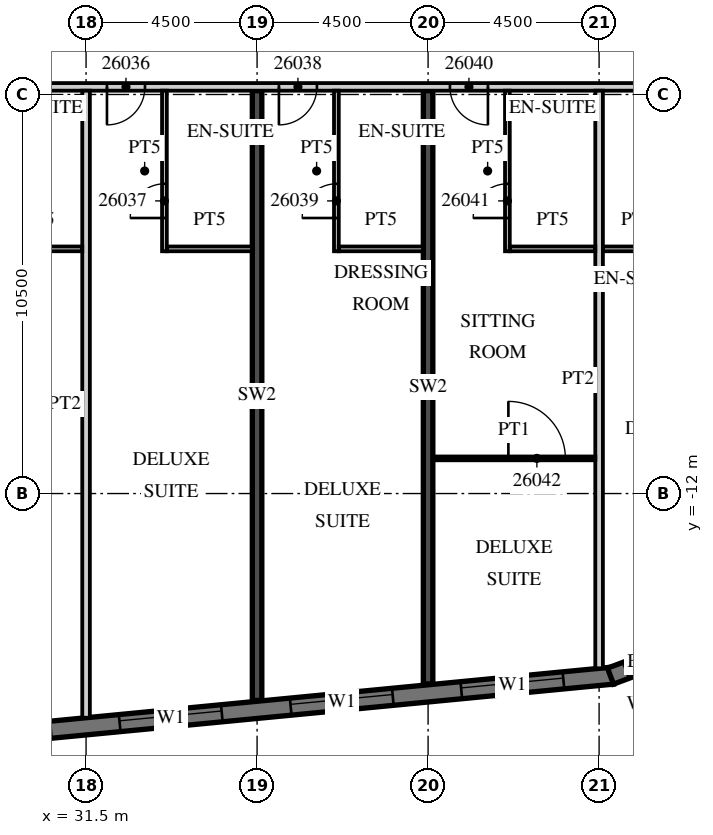
"""IFC4 building model, lengths in metres.
Left out: names, types, materials, properties, quantities, classifications, styles, units other than length and angle.
Written with IfcOpenShell. Run it as: python <this file> out.ifc"""

import sys

from ifc_helpers import new_model, si_unit, direction, frame, frame_2d, origin, place, context, subcontext, project, spatial, polyline, rectangle, outline, extrude, element, fill, save


model = new_model("IFC4")
c1 = context("Model", 3, precision=1e-05, world=origin(), true_north=direction((0.0, 1.0)))
c2 = subcontext(c1, "Body", "Model", "MODEL_VIEW")
j1 = project(units=[si_unit("LENGTHUNIT", "METRE"), si_unit("PLANEANGLEUNIT", "RADIAN")], contexts=[c1])
p1 = place(None, origin())
s1 = spatial("IfcSite", under=j1, at=p1, CompositionType="ELEMENT")
p2 = place(p1, origin())
s2 = spatial("IfcBuilding", under=s1, at=p2, CompositionType="ELEMENT")
p3 = place(p2, frame((0.0, 0.0, 120.7)))
s3 = spatial("IfcBuildingStorey", under=s2, at=p3, CompositionType="ELEMENT", Elevation=120.7)
p4 = place(p3, frame((36.0, -17.444, 0.0), z_axis=(0.0, 0.0, 1.0), x_axis=(0.0, 1.0, 0.0)))
e1 = element("IfcWall", 1, at=p4, inside=s3, PredefinedType="SHEAR", context=c2, shape_type="SweptSolid", body=[
    extrude(rectangle(XDim=16.044, YDim=0.25, at=frame_2d((8.022, 0.0))), origin(), (0.0, 0.0, 1.0), 3.3),
])
p5 = place(p3, frame((40.5, -17.011, 0.0), z_axis=(0.0, 0.0, 1.0), x_axis=(0.0, 1.0, 0.0)))
e2 = element("IfcWall", 2, at=p5, inside=s3, PredefinedType="SHEAR", context=c2, shape_type="SweptSolid", body=[
    extrude(rectangle(XDim=15.611, YDim=0.25, at=frame_2d((7.805, 0.0))), origin(), (0.0, 0.0, 1.0), 3.3),
])
p6 = place(p3, frame((-13.521, -22.46, 0.0), z_axis=(0.0, 0.0, 1.0), x_axis=(0.995396096335, 0.095846812164, 0.0)))
e3 = element("IfcWall", 3, at=p6, inside=s3, PredefinedType="SOLIDWALL", context=c2, shape_type="SweptSolid", body=[
    extrude(rectangle(XDim=59.151, YDim=0.45, at=frame_2d((29.575, 0.0))), origin(), (0.0, 0.0, 1.0), 3.02),
])
p7 = place(p6, frame((0.91, 0.0, 0.45)))
e4 = element("IfcOpeningElement", 4, at=p7, cuts=e3, PredefinedType="OPENING", context=c2, shape_type="SweptSolid", body=[
    extrude(rectangle(XDim=2.7, YDim=2.25, at=frame_2d((1.35, 1.125))), frame((0.0, 0.235, 0.0), z_axis=(0.0, -1.0, 0.0), x_axis=(1.0, 0.0, 0.0)), (0.0, 0.0, 1.0), 0.47),
])
p8 = place(p6, frame((5.431, 0.0, 0.45)))
e5 = element("IfcOpeningElement", 5, at=p8, cuts=e3, PredefinedType="OPENING", context=c2, shape_type="SweptSolid", body=[
    extrude(rectangle(XDim=2.7, YDim=2.25, at=frame_2d((1.35, 1.125))), frame((0.0, 0.235, 0.0), z_axis=(0.0, -1.0, 0.0), x_axis=(1.0, 0.0, 0.0)), (0.0, 0.0, 1.0), 0.47),
])
p9 = place(p6, frame((9.952, 0.0, 0.45)))
e6 = element("IfcOpeningElement", 6, at=p9, cuts=e3, PredefinedType="OPENING", context=c2, shape_type="SweptSolid", body=[
    extrude(rectangle(XDim=2.7, YDim=2.25, at=frame_2d((1.35, 1.125))), frame((0.0, 0.235, 0.0), z_axis=(0.0, -1.0, 0.0), x_axis=(1.0, 0.0, 0.0)), (0.0, 0.0, 1.0), 0.47),
])
p10 = place(p6, frame((14.473, 0.0, 0.45)))
e7 = element("IfcOpeningElement", 7, at=p10, cuts=e3, PredefinedType="OPENING", context=c2, shape_type="SweptSolid", body=[
    extrude(rectangle(XDim=2.7, YDim=2.25, at=frame_2d((1.35, 1.125))), frame((0.0, 0.235, 0.0), z_axis=(0.0, -1.0, 0.0), x_axis=(1.0, 0.0, 0.0)), (0.0, 0.0, 1.0), 0.47),
])
p11 = place(p6, frame((18.994, 0.0, 0.45)))
e8 = element("IfcOpeningElement", 8, at=p11, cuts=e3, PredefinedType="OPENING", context=c2, shape_type="SweptSolid", body=[
    extrude(rectangle(XDim=2.7, YDim=2.25, at=frame_2d((1.35, 1.125))), frame((0.0, 0.235, 0.0), z_axis=(0.0, -1.0, 0.0), x_axis=(1.0, 0.0, 0.0)), (0.0, 0.0, 1.0), 0.47),
])
p12 = place(p6, frame((23.514, 0.0, 0.45)))
e9 = element("IfcOpeningElement", 9, at=p12, cuts=e3, PredefinedType="OPENING", context=c2, shape_type="SweptSolid", body=[
    extrude(rectangle(XDim=2.7, YDim=2.25, at=frame_2d((1.35, 1.125))), frame((0.0, 0.235, 0.0), z_axis=(0.0, -1.0, 0.0), x_axis=(1.0, 0.0, 0.0)), (0.0, 0.0, 1.0), 0.47),
])
p13 = place(p6, frame((28.035, 0.0, 0.45)))
e10 = element("IfcOpeningElement", 10, at=p13, cuts=e3, PredefinedType="OPENING", context=c2, shape_type="SweptSolid", body=[
    extrude(rectangle(XDim=2.7, YDim=2.25, at=frame_2d((1.35, 1.125))), frame((0.0, 0.235, 0.0), z_axis=(0.0, -1.0, 0.0), x_axis=(1.0, 0.0, 0.0)), (0.0, 0.0, 1.0), 0.47),
])
p14 = place(p6, frame((32.556, 0.0, 0.45)))
e11 = element("IfcOpeningElement", 11, at=p14, cuts=e3, PredefinedType="OPENING", context=c2, shape_type="SweptSolid", body=[
    extrude(rectangle(XDim=2.7, YDim=2.25, at=frame_2d((1.35, 1.125))), frame((0.0, 0.235, 0.0), z_axis=(0.0, -1.0, 0.0), x_axis=(1.0, 0.0, 0.0)), (0.0, 0.0, 1.0), 0.47),
])
p15 = place(p6, frame((37.077, 0.0, 0.45)))
e12 = element("IfcOpeningElement", 12, at=p15, cuts=e3, PredefinedType="OPENING", context=c2, shape_type="SweptSolid", body=[
    extrude(rectangle(XDim=2.7, YDim=2.25, at=frame_2d((1.35, 1.125))), frame((0.0, 0.235, 0.0), z_axis=(0.0, -1.0, 0.0), x_axis=(1.0, 0.0, 0.0)), (0.0, 0.0, 1.0), 0.47),
])
p16 = place(p6, frame((41.598, 0.0, 0.45)))
e13 = element("IfcOpeningElement", 13, at=p16, cuts=e3, PredefinedType="OPENING", context=c2, shape_type="SweptSolid", body=[
    extrude(rectangle(XDim=2.7, YDim=2.25, at=frame_2d((1.35, 1.125))), frame((0.0, 0.235, 0.0), z_axis=(0.0, -1.0, 0.0), x_axis=(1.0, 0.0, 0.0)), (0.0, 0.0, 1.0), 0.47),
])
p17 = place(p6, frame((46.118, 0.0, 0.45)))
e14 = element("IfcOpeningElement", 14, at=p17, cuts=e3, PredefinedType="OPENING", context=c2, shape_type="SweptSolid", body=[
    extrude(rectangle(XDim=2.7, YDim=2.25, at=frame_2d((1.35, 1.125))), frame((0.0, 0.235, 0.0), z_axis=(0.0, -1.0, 0.0), x_axis=(1.0, 0.0, 0.0)), (0.0, 0.0, 1.0), 0.47),
])
p18 = place(p6, frame((50.639, 0.0, 0.45)))
e15 = element("IfcOpeningElement", 15, at=p18, cuts=e3, PredefinedType="OPENING", context=c2, shape_type="SweptSolid", body=[
    extrude(rectangle(XDim=2.7, YDim=2.25, at=frame_2d((1.35, 1.125))), frame((0.0, 0.235, 0.0), z_axis=(0.0, -1.0, 0.0), x_axis=(1.0, 0.0, 0.0)), (0.0, 0.0, 1.0), 0.47),
])
p19 = place(p6, frame((55.15, 0.0, 0.45)))
e16 = element("IfcOpeningElement", 16, at=p19, cuts=e3, PredefinedType="OPENING", context=c2, shape_type="SweptSolid", body=[
    extrude(rectangle(XDim=2.7, YDim=2.25, at=frame_2d((1.35, 1.125))), frame((0.0, 0.235, 0.0), z_axis=(0.0, -1.0, 0.0), x_axis=(1.0, 0.0, 0.0)), (0.0, 0.0, 1.0), 0.47),
])
p20 = place(p3, frame((45.3, -16.804, 0.0), z_axis=(0.0, 0.0, 1.0), x_axis=(0.936677599948, 0.350192909346, 0.0)))
e17 = element("IfcWall", 17, at=p20, inside=s3, PredefinedType="SOLIDWALL", context=c2, shape_type="SweptSolid", body=[
    extrude(outline(polyline([(0.0, -0.225), (2.071, -0.225), (1.95, 0.225), (0.121, 0.225), (0.0, -0.225)])), origin(), (0.0, 0.0, 1.0), 3.02),
])
p21 = place(p20, frame((0.435, 0.0, 0.45)))
e18 = element("IfcOpeningElement", 18, at=p21, cuts=e17, PredefinedType="OPENING", context=c2, shape_type="SweptSolid", body=[
    extrude(rectangle(XDim=1.2, YDim=2.25, at=frame_2d((0.6, 1.125))), frame((0.0, 0.235, 0.0), z_axis=(0.0, -1.0, 0.0), x_axis=(1.0, 0.0, 0.0)), (0.0, 0.0, 1.0), 0.47),
])
p22 = place(p3, frame((48.753, -12.672, 0.0), z_axis=(0.0, 0.0, 1.0), x_axis=(-0.095842661909, 0.995396495954, 0.0)))
e19 = element("IfcWall", 19, at=p22, inside=s3, PredefinedType="SOLIDWALL", context=c2, shape_type="SweptSolid", body=[
    extrude(rectangle(XDim=35.0, YDim=0.45, at=frame_2d((17.5, 0.0))), origin(), (0.0, 0.0, 1.0), 3.02),
])
p23 = place(p22, frame((3.072, 0.0, 0.45)))
e20 = element("IfcOpeningElement", 20, at=p23, cuts=e19, PredefinedType="OPENING", context=c2, shape_type="SweptSolid", body=[
    extrude(rectangle(XDim=3.3, YDim=2.25, at=frame_2d((1.65, 1.125))), frame((0.0, 0.235, 0.0), z_axis=(0.0, -1.0, 0.0), x_axis=(1.0, 0.0, 0.0)), (0.0, 0.0, 1.0), 0.47),
])
p24 = place(p22, frame((7.593, 0.0, 0.45)))
e21 = element("IfcOpeningElement", 21, at=p24, cuts=e19, PredefinedType="OPENING", context=c2, shape_type="SweptSolid", body=[
    extrude(rectangle(XDim=3.3, YDim=2.25, at=frame_2d((1.65, 1.125))), frame((0.0, 0.235, 0.0), z_axis=(0.0, -1.0, 0.0), x_axis=(1.0, 0.0, 0.0)), (0.0, 0.0, 1.0), 0.47),
])
p25 = place(p3, frame((-13.5, -1.3, 0.0), z_axis=(0.0, 0.0, 1.0), x_axis=(1.0, 0.0, 0.0)))
e22 = element("IfcWall", 22, at=p25, inside=s3, PredefinedType="PARTITIONING", context=c2, shape_type="SweptSolid", body=[
    extrude(rectangle(XDim=60.932, YDim=0.2, at=frame_2d((30.466, 0.0))), origin(), (0.0, 0.0, 1.0), 3.02),
])
p26 = place(p25, frame((2.925, 0.0, 0.0)))
e23 = element("IfcOpeningElement", 23, at=p26, cuts=e22, PredefinedType="OPENING", context=c2, shape_type="SweptSolid", body=[
    extrude(rectangle(XDim=1.0, YDim=2.1, at=frame_2d((0.5, 1.05))), frame((0.0, 0.11, 0.0), z_axis=(0.0, -1.0, 0.0), x_axis=(1.0, 0.0, 0.0)), (0.0, 0.0, 1.0), 0.22),
])
p27 = place(p25, frame((9.863, 0.0, 0.0)))
e24 = element("IfcOpeningElement", 24, at=p27, cuts=e22, PredefinedType="OPENING", context=c2, shape_type="SweptSolid", body=[
    extrude(rectangle(XDim=1.2, YDim=2.1, at=frame_2d((0.6, 1.05))), frame((0.0, 0.11, 0.0), z_axis=(0.0, -1.0, 0.0), x_axis=(1.0, 0.0, 0.0)), (0.0, 0.0, 1.0), 0.22),
])
p28 = place(p25, frame((15.938, 0.0, 0.0)))
e25 = element("IfcOpeningElement", 25, at=p28, cuts=e22, PredefinedType="OPENING", context=c2, shape_type="SweptSolid", body=[
    extrude(rectangle(XDim=1.2, YDim=2.1, at=frame_2d((0.6, 1.05))), frame((0.0, 0.11, 0.0), z_axis=(0.0, -1.0, 0.0), x_axis=(1.0, 0.0, 0.0)), (0.0, 0.0, 1.0), 0.22),
])
p29 = place(p25, frame((27.862, 0.0, 0.0)))
e26 = element("IfcOpeningElement", 26, at=p29, cuts=e22, PredefinedType="OPENING", context=c2, shape_type="SweptSolid", body=[
    extrude(rectangle(XDim=1.2, YDim=2.1, at=frame_2d((0.6, 1.05))), frame((0.0, 0.11, 0.0), z_axis=(0.0, -1.0, 0.0), x_axis=(1.0, 0.0, 0.0)), (0.0, 0.0, 1.0), 0.22),
])
p30 = place(p25, frame((34.45, 0.0, 0.0)))
e27 = element("IfcOpeningElement", 27, at=p30, cuts=e22, PredefinedType="OPENING", context=c2, shape_type="SweptSolid", body=[
    extrude(rectangle(XDim=1.0, YDim=2.1, at=frame_2d((0.5, 1.05))), frame((0.0, 0.11, 0.0), z_axis=(0.0, -1.0, 0.0), x_axis=(1.0, 0.0, 0.0)), (0.0, 0.0, 1.0), 0.22),
])
p31 = place(p25, frame((36.55, 0.0, 0.0)))
e28 = element("IfcOpeningElement", 28, at=p31, cuts=e22, PredefinedType="OPENING", context=c2, shape_type="SweptSolid", body=[
    extrude(rectangle(XDim=1.0, YDim=2.1, at=frame_2d((0.5, 1.05))), frame((0.0, 0.11, 0.0), z_axis=(0.0, -1.0, 0.0), x_axis=(1.0, 0.0, 0.0)), (0.0, 0.0, 1.0), 0.22),
])
p32 = place(p25, frame((41.075, 0.0, 0.0)))
e29 = element("IfcOpeningElement", 29, at=p32, cuts=e22, PredefinedType="OPENING", context=c2, shape_type="SweptSolid", body=[
    extrude(rectangle(XDim=1.0, YDim=2.1, at=frame_2d((0.5, 1.05))), frame((0.0, 0.11, 0.0), z_axis=(0.0, -1.0, 0.0), x_axis=(1.0, 0.0, 0.0)), (0.0, 0.0, 1.0), 0.22),
])
p33 = place(p25, frame((45.55, 0.0, 0.0)))
e30 = element("IfcOpeningElement", 30, at=p33, cuts=e22, PredefinedType="OPENING", context=c2, shape_type="SweptSolid", body=[
    extrude(rectangle(XDim=1.0, YDim=2.1, at=frame_2d((0.5, 1.05))), frame((0.0, 0.11, 0.0), z_axis=(0.0, -1.0, 0.0), x_axis=(1.0, 0.0, 0.0)), (0.0, 0.0, 1.0), 0.22),
])
p34 = place(p25, frame((50.075, 0.0, 0.0)))
e31 = element("IfcOpeningElement", 31, at=p34, cuts=e22, PredefinedType="OPENING", context=c2, shape_type="SweptSolid", body=[
    extrude(rectangle(XDim=1.0, YDim=2.1, at=frame_2d((0.5, 1.05))), frame((0.0, 0.11, 0.0), z_axis=(0.0, -1.0, 0.0), x_axis=(1.0, 0.0, 0.0)), (0.0, 0.0, 1.0), 0.22),
])
p35 = place(p25, frame((54.575, 0.0, 0.0)))
e32 = element("IfcOpeningElement", 32, at=p35, cuts=e22, PredefinedType="OPENING", context=c2, shape_type="SweptSolid", body=[
    extrude(rectangle(XDim=1.0, YDim=2.1, at=frame_2d((0.5, 1.05))), frame((0.0, 0.11, 0.0), z_axis=(0.0, -1.0, 0.0), x_axis=(1.0, 0.0, 0.0)), (0.0, 0.0, 1.0), 0.22),
])
p36 = place(p25, frame((59.882, 0.0, 0.0)))
e33 = element("IfcOpeningElement", 33, at=p36, cuts=e22, PredefinedType="OPENING", context=c2, shape_type="SweptSolid", body=[
    extrude(rectangle(XDim=0.9, YDim=2.1, at=frame_2d((0.45, 1.05))), frame((0.0, 0.11, 0.0), z_axis=(0.0, -1.0, 0.0), x_axis=(1.0, 0.0, 0.0)), (0.0, 0.0, 1.0), 0.22),
])
p37 = place(p3, frame((31.5, -17.899, 0.0), z_axis=(0.0, 0.0, 1.0), x_axis=(0.0, 1.0, 0.0)))
e34 = element("IfcWall", 34, at=p37, inside=s3, PredefinedType="PARTITIONING", context=c2, shape_type="SweptSolid", body=[
    extrude(rectangle(XDim=16.499, YDim=0.2, at=frame_2d((8.25, 0.0))), origin(), (0.0, 0.0, 1.0), 3.02),
])
p38 = place(p3, frame((29.15, -5.562, 0.0), z_axis=(0.0, 0.0, 1.0), x_axis=(1.0, 0.0, 0.0)))
e35 = element("IfcWall", 35, at=p38, inside=s3, PredefinedType="PARTITIONING", context=c2, shape_type="SweptSolid", body=[
    extrude(rectangle(XDim=2.25, YDim=0.125, at=frame_2d((1.125, 0.0))), origin(), (0.0, 0.0, 1.0), 3.02),
])
p39 = place(p3, frame((33.562, -5.625, 0.0), z_axis=(0.0, 0.0, 1.0), x_axis=(0.0, 1.0, 0.0)))
e36 = element("IfcWall", 36, at=p39, inside=s3, PredefinedType="PARTITIONING", context=c2, shape_type="SweptSolid", body=[
    extrude(rectangle(XDim=4.225, YDim=0.125, at=frame_2d((2.113, 0.0))), origin(), (0.0, 0.0, 1.0), 3.02),
])
p40 = place(p39, frame((0.875, 0.0, 0.0)))
e37 = element("IfcOpeningElement", 37, at=p40, cuts=e36, PredefinedType="OPENING", context=c2, shape_type="SweptSolid", body=[
    extrude(rectangle(XDim=0.9, YDim=2.1, at=frame_2d((0.45, 1.05))), frame((0.0, 0.073, 0.0), z_axis=(0.0, -1.0, 0.0), x_axis=(1.0, 0.0, 0.0)), (0.0, 0.0, 1.0), 0.145),
])
p41 = place(p3, frame((33.625, -5.562, 0.0), z_axis=(0.0, 0.0, 1.0), x_axis=(1.0, 0.0, 0.0)))
e38 = element("IfcWall", 38, at=p41, inside=s3, PredefinedType="PARTITIONING", context=c2, shape_type="SweptSolid", body=[
    extrude(rectangle(XDim=2.25, YDim=0.125, at=frame_2d((1.125, 0.0))), origin(), (0.0, 0.0, 1.0), 3.02),
])
p42 = place(p3, frame((38.087, -5.625, 0.0), z_axis=(0.0, 0.0, 1.0), x_axis=(0.0, 1.0, 0.0)))
e39 = element("IfcWall", 39, at=p42, inside=s3, PredefinedType="PARTITIONING", context=c2, shape_type="SweptSolid", body=[
    extrude(rectangle(XDim=4.225, YDim=0.125, at=frame_2d((2.113, 0.0))), origin(), (0.0, 0.0, 1.0), 3.02),
])
p43 = place(p42, frame((0.875, 0.0, 0.0)))
e40 = element("IfcOpeningElement", 40, at=p43, cuts=e39, PredefinedType="OPENING", context=c2, shape_type="SweptSolid", body=[
    extrude(rectangle(XDim=0.9, YDim=2.1, at=frame_2d((0.45, 1.05))), frame((0.0, 0.073, 0.0), z_axis=(0.0, -1.0, 0.0), x_axis=(1.0, 0.0, 0.0)), (0.0, 0.0, 1.0), 0.145),
])
p44 = place(p3, frame((38.15, -5.562, 0.0), z_axis=(0.0, 0.0, 1.0), x_axis=(1.0, 0.0, 0.0)))
e41 = element("IfcWall", 41, at=p44, inside=s3, PredefinedType="PARTITIONING", context=c2, shape_type="SweptSolid", body=[
    extrude(rectangle(XDim=2.225, YDim=0.125, at=frame_2d((1.113, 0.0))), origin(), (0.0, 0.0, 1.0), 3.02),
])
p45 = place(p3, frame((45.0, -16.599, 0.0), z_axis=(0.0, 0.0, 1.0), x_axis=(0.0, 1.0, 0.0)))
e42 = element("IfcWall", 42, at=p45, inside=s3, PredefinedType="PARTITIONING", context=c2, shape_type="SweptSolid", body=[
    extrude(rectangle(XDim=15.199, YDim=0.2, at=frame_2d((7.6, 0.0))), origin(), (0.0, 0.0, 1.0), 3.02),
])
p46 = place(p3, frame((42.587, -5.625, 0.0), z_axis=(0.0, 0.0, 1.0), x_axis=(0.0, 1.0, 0.0)))
e43 = element("IfcWall", 43, at=p46, inside=s3, PredefinedType="PARTITIONING", context=c2, shape_type="SweptSolid", body=[
    extrude(rectangle(XDim=4.225, YDim=0.125, at=frame_2d((2.113, 0.0))), origin(), (0.0, 0.0, 1.0), 3.02),
])
p47 = place(p46, frame((0.875, 0.0, 0.0)))
e44 = element("IfcOpeningElement", 44, at=p47, cuts=e43, PredefinedType="OPENING", context=c2, shape_type="SweptSolid", body=[
    extrude(rectangle(XDim=0.9, YDim=2.1, at=frame_2d((0.45, 1.05))), frame((0.0, 0.073, 0.0), z_axis=(0.0, -1.0, 0.0), x_axis=(1.0, 0.0, 0.0)), (0.0, 0.0, 1.0), 0.145),
])
p48 = place(p3, frame((42.65, -5.562, 0.0), z_axis=(0.0, 0.0, 1.0), x_axis=(1.0, 0.0, 0.0)))
e45 = element("IfcWall", 45, at=p48, inside=s3, PredefinedType="PARTITIONING", context=c2, shape_type="SweptSolid", body=[
    extrude(rectangle(XDim=2.25, YDim=0.125, at=frame_2d((1.125, 0.0))), origin(), (0.0, 0.0, 1.0), 3.02),
])
p49 = place(p3, frame((40.625, -11.075, 0.0), z_axis=(0.0, 0.0, 1.0), x_axis=(1.0, 0.0, 0.0)))
e46 = element("IfcWall", 46, at=p49, inside=s3, PredefinedType="PARTITIONING", context=c2, shape_type="SweptSolid", body=[
    extrude(rectangle(XDim=4.275, YDim=0.1, at=frame_2d((2.137, 0.0))), origin(), (0.0, 0.0, 1.0), 3.02),
])
p50 = place(p49, frame((1.988, 0.0, 0.0)))
e47 = element("IfcOpeningElement", 47, at=p50, cuts=e46, PredefinedType="OPENING", context=c2, shape_type="SweptSolid", body=[
    extrude(rectangle(XDim=1.5, YDim=2.1, at=frame_2d((0.75, 1.05))), frame((0.0, 0.06, 0.0), z_axis=(0.0, -1.0, 0.0), x_axis=(1.0, 0.0, 0.0)), (0.0, 0.0, 1.0), 0.12),
])
p51 = place(p3, frame((45.1, -5.562, 0.0), z_axis=(0.0, 0.0, 1.0), x_axis=(1.0, 0.0, 0.0)))
e48 = element("IfcWall", 48, at=p51, inside=s3, PredefinedType="PARTITIONING", context=c2, shape_type="SweptSolid", body=[
    extrude(rectangle(XDim=1.8, YDim=0.125, at=frame_2d((0.9, 0.0))), origin(), (0.0, 0.0, 1.0), 3.02),
])
p52 = place(p17, origin())
e49 = element("IfcWindow", 49, at=p52, inside=s3, PartitioningType="SINGLE_PANEL", PredefinedType="WINDOW", context=c2, shape_type="SweptSolid", body=[
    extrude(rectangle(XDim=2.7, YDim=2.25, at=frame_2d((1.35, 1.125))), frame((0.0, 0.09, 0.0), z_axis=(0.0, -1.0, 0.0), x_axis=(1.0, 0.0, 0.0)), (0.0, 0.0, 1.0), 0.06),
])
fill(e14, e49)
p53 = place(p18, origin())
e50 = element("IfcWindow", 50, at=p53, inside=s3, PartitioningType="SINGLE_PANEL", PredefinedType="WINDOW", context=c2, shape_type="SweptSolid", body=[
    extrude(rectangle(XDim=2.7, YDim=2.25, at=frame_2d((1.35, 1.125))), frame((0.0, 0.09, 0.0), z_axis=(0.0, -1.0, 0.0), x_axis=(1.0, 0.0, 0.0)), (0.0, 0.0, 1.0), 0.06),
])
fill(e15, e50)
p54 = place(p19, origin())
e51 = element("IfcWindow", 51, at=p54, inside=s3, PartitioningType="SINGLE_PANEL", PredefinedType="WINDOW", context=c2, shape_type="SweptSolid", body=[
    extrude(rectangle(XDim=2.7, YDim=2.25, at=frame_2d((1.35, 1.125))), frame((0.0, 0.09, 0.0), z_axis=(0.0, -1.0, 0.0), x_axis=(1.0, 0.0, 0.0)), (0.0, 0.0, 1.0), 0.06),
])
fill(e16, e51)
p55 = place(p21, origin())
e52 = element("IfcWindow", 52, at=p55, inside=s3, PartitioningType="SINGLE_PANEL", PredefinedType="WINDOW", context=c2, shape_type="SweptSolid", body=[
    extrude(rectangle(XDim=1.2, YDim=2.25, at=frame_2d((0.6, 1.125))), frame((0.0, 0.09, 0.0), z_axis=(0.0, -1.0, 0.0), x_axis=(1.0, 0.0, 0.0)), (0.0, 0.0, 1.0), 0.06),
])
fill(e18, e52)
p56 = place(p33, origin())
e53 = element("IfcDoor", 53, at=p56, inside=s3, OperationType="SINGLE_SWING_LEFT", PredefinedType="DOOR", context=c2, shape_type="SweptSolid", body=[
    extrude(rectangle(XDim=1.0, YDim=2.1, at=frame_2d((0.5, 1.05))), frame((0.0, 0.025, 0.0), z_axis=(0.0, -1.0, 0.0), x_axis=(1.0, 0.0, 0.0)), (0.0, 0.0, 1.0), 0.05),
])
fill(e30, e53)
p57 = place(p40, origin())
e54 = element("IfcDoor", 54, at=p57, inside=s3, OperationType="SINGLE_SWING_LEFT", PredefinedType="DOOR", context=c2, shape_type="SweptSolid", body=[
    extrude(rectangle(XDim=0.9, YDim=2.1, at=frame_2d((0.45, 1.05))), frame((0.0, 0.025, 0.0), z_axis=(0.0, -1.0, 0.0), x_axis=(1.0, 0.0, 0.0)), (0.0, 0.0, 1.0), 0.05),
])
fill(e37, e54)
p58 = place(p34, origin())
e55 = element("IfcDoor", 55, at=p58, inside=s3, OperationType="SINGLE_SWING_LEFT", PredefinedType="DOOR", context=c2, shape_type="SweptSolid", body=[
    extrude(rectangle(XDim=1.0, YDim=2.1, at=frame_2d((0.5, 1.05))), frame((0.0, 0.025, 0.0), z_axis=(0.0, -1.0, 0.0), x_axis=(1.0, 0.0, 0.0)), (0.0, 0.0, 1.0), 0.05),
])
fill(e31, e55)
p59 = place(p43, origin())
e56 = element("IfcDoor", 56, at=p59, inside=s3, OperationType="SINGLE_SWING_LEFT", PredefinedType="DOOR", context=c2, shape_type="SweptSolid", body=[
    extrude(rectangle(XDim=0.9, YDim=2.1, at=frame_2d((0.45, 1.05))), frame((0.0, 0.025, 0.0), z_axis=(0.0, -1.0, 0.0), x_axis=(1.0, 0.0, 0.0)), (0.0, 0.0, 1.0), 0.05),
])
fill(e40, e56)
p60 = place(p35, origin())
e57 = element("IfcDoor", 57, at=p60, inside=s3, OperationType="SINGLE_SWING_RIGHT", PredefinedType="DOOR", context=c2, shape_type="SweptSolid", body=[
    extrude(rectangle(XDim=1.0, YDim=2.1, at=frame_2d((0.5, 1.05))), frame((0.0, 0.025, 0.0), z_axis=(0.0, -1.0, 0.0), x_axis=(1.0, 0.0, 0.0)), (0.0, 0.0, 1.0), 0.05),
])
fill(e32, e57)
p61 = place(p47, origin())
e58 = element("IfcDoor", 58, at=p61, inside=s3, OperationType="SINGLE_SWING_LEFT", PredefinedType="DOOR", context=c2, shape_type="SweptSolid", body=[
    extrude(rectangle(XDim=0.9, YDim=2.1, at=frame_2d((0.45, 1.05))), frame((0.0, 0.025, 0.0), z_axis=(0.0, -1.0, 0.0), x_axis=(1.0, 0.0, 0.0)), (0.0, 0.0, 1.0), 0.05),
])
fill(e44, e58)
p62 = place(p50, origin())
e59 = element("IfcDoor", 59, at=p62, inside=s3, OperationType="SINGLE_SWING_LEFT", PredefinedType="DOOR", context=c2, shape_type="SweptSolid", body=[
    extrude(rectangle(XDim=1.5, YDim=2.1, at=frame_2d((0.75, 1.05))), frame((0.0, 0.025, 0.0), z_axis=(0.0, -1.0, 0.0), x_axis=(1.0, 0.0, 0.0)), (0.0, 0.0, 1.0), 0.05),
])
fill(e47, e59)
save(model, sys.argv[1])
